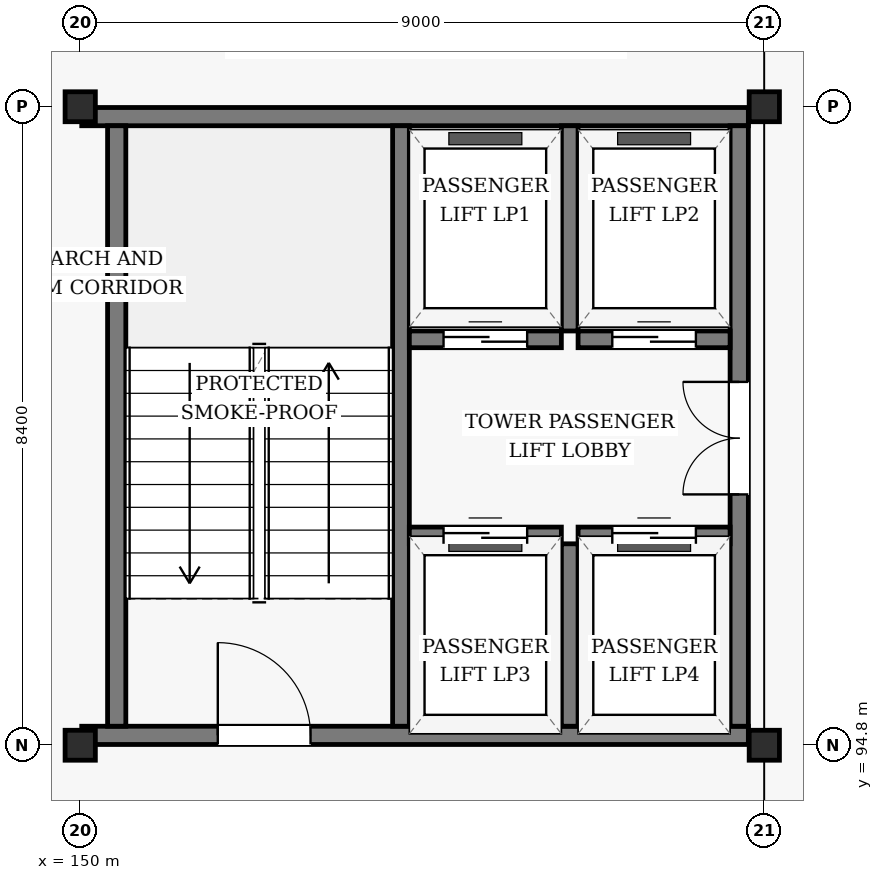
"""IFC4 building model, lengths in metres.
Left out: names, types, materials, properties, quantities, classifications, styles, units other than length and angle.
Written with IfcOpenShell. Run it as: python <this file> out.ifc"""

import sys

from ifc_helpers import new_model, si_unit, direction, frame, frame_2d, origin, origin_2d, place, context, subcontext, project, spatial, rectangle, i_section, extrude, element, fill, save


model = new_model("IFC4")
c1 = context("Model", 3, precision=1e-05, world=origin(), true_north=direction((0.0, 1.0)))
c2 = subcontext(c1, "Body", "Model", "MODEL_VIEW")
j1 = project(units=[si_unit("LENGTHUNIT", "METRE"), si_unit("PLANEANGLEUNIT", "RADIAN")], contexts=[c1])
p1 = place(None, origin())
s1 = spatial("IfcSite", under=j1, at=p1, CompositionType="ELEMENT")
p2 = place(p1, origin())
s2 = spatial("IfcBuilding", under=s1, at=p2, CompositionType="ELEMENT")
p3 = place(p2, frame((0.0, 0.0, 24.6)))
s3 = spatial("IfcBuildingStorey", under=s2, at=p3, CompositionType="ELEMENT", Elevation=24.6)
for number, where, z_axis, x_axis in (
    (1, (150.0, 94.8, 0.0), (0.0, 0.0, 1.0), (1.0, 0.0, 0.0)),
    (2, (150.0, 103.2, 0.0), (0.0, 0.0, 1.0), (1.0, 0.0, 0.0)),
    (3, (159.0, 94.8, 0.0), (0.0, 0.0, 1.0), (1.0, 0.0, 0.0)),
    (4, (159.0, 103.2, 0.0), (0.0, 0.0, 1.0), (1.0, 0.0, 0.0)),
):
    element("IfcColumn", number, at=place(p3, frame(where, z_axis=z_axis, x_axis=x_axis)), inside=s3, PredefinedType="COLUMN", context=c2, shape_type="SweptSolid", body=[
        extrude(i_section(OverallWidth=0.398, OverallDepth=0.394, WebThickness=0.011, FlangeThickness=0.018, FilletRadius=0.022, at=origin_2d()), origin(), (0.0, 0.0, 1.0), 3.6),
    ])
p4 = place(p3, frame((150.02, 94.93, 0.0), z_axis=(0.0, 0.0, 1.0), x_axis=(1.0, 0.0, 0.0)))
e5 = element("IfcWall", 5, at=p4, inside=s3, PredefinedType="SHEAR", context=c2, shape_type="SweptSolid", body=[
    extrude(rectangle(XDim=8.77, YDim=0.24, at=frame_2d((4.385, 0.0))), origin(), (0.0, 0.0, 1.0), 3.345),
])
p5 = place(p4, frame((1.79, 0.0, 0.0)))
e6 = element("IfcOpeningElement", 6, at=p5, cuts=e5, PredefinedType="OPENING", context=c2, shape_type="SweptSolid", body=[
    extrude(rectangle(XDim=1.22, YDim=2.18, at=frame_2d((0.61, 1.09))), frame((0.0, 0.13, 0.0), z_axis=(0.0, -1.0, 0.0), x_axis=(1.0, 0.0, 0.0)), (0.0, 0.0, 1.0), 0.26),
])
p6 = place(p3, frame((150.02, 103.07, 0.0), z_axis=(0.0, 0.0, 1.0), x_axis=(1.0, 0.0, 0.0)))
e7 = element("IfcWall", 7, at=p6, inside=s3, PredefinedType="SHEAR", context=c2, shape_type="SweptSolid", body=[
    extrude(rectangle(XDim=8.77, YDim=0.24, at=frame_2d((4.385, 0.0))), origin(), (0.0, 0.0, 1.0), 3.345),
])
p7 = place(p3, frame((150.48, 95.05, 0.0), z_axis=(0.0, 0.0, 1.0), x_axis=(0.0, 1.0, 0.0)))
e8 = element("IfcWall", 8, at=p7, inside=s3, PredefinedType="SHEAR", context=c2, shape_type="SweptSolid", body=[
    extrude(rectangle(XDim=7.9, YDim=0.24, at=frame_2d((3.95, 0.0))), origin(), (0.0, 0.0, 1.0), 3.345),
])
p8 = place(p3, frame((154.22, 95.05, 0.0), z_axis=(0.0, 0.0, 1.0), x_axis=(0.0, 1.0, 0.0)))
e9 = element("IfcWall", 9, at=p8, inside=s3, PredefinedType="SHEAR", context=c2, shape_type="SweptSolid", body=[
    extrude(rectangle(XDim=7.9, YDim=0.22, at=frame_2d((3.95, 0.0))), origin(), (0.0, 0.0, 1.0), 3.345),
])
p9 = place(p3, frame((158.67, 95.05, 0.0), z_axis=(0.0, 0.0, 1.0), x_axis=(0.0, 1.0, 0.0)))
e10 = element("IfcWall", 10, at=p9, inside=s3, PredefinedType="SHEAR", context=c2, shape_type="SweptSolid", body=[
    extrude(rectangle(XDim=7.9, YDim=0.24, at=frame_2d((3.95, 0.0))), origin(), (0.0, 0.0, 1.0), 3.345),
])
p10 = place(p9, frame((3.05, 0.0, 0.0)))
e11 = element("IfcOpeningElement", 11, at=p10, cuts=e10, PredefinedType="OPENING", context=c2, shape_type="SweptSolid", body=[
    extrude(rectangle(XDim=1.48, YDim=2.22, at=frame_2d((0.74, 1.11))), frame((0.0, 0.13, 0.0), z_axis=(0.0, -1.0, 0.0), x_axis=(1.0, 0.0, 0.0)), (0.0, 0.0, 1.0), 0.26),
])
p11 = place(p3, frame((156.44, 100.25, 0.0), z_axis=(0.0, 0.0, 1.0), x_axis=(0.0, 1.0, 0.0)))
e12 = element("IfcWall", 12, at=p11, inside=s3, PredefinedType="SHEAR", context=c2, shape_type="SweptSolid", body=[
    extrude(rectangle(XDim=2.7, YDim=0.22, at=frame_2d((1.35, 0.0))), origin(), (0.0, 0.0, 1.0), 3.345),
])
p12 = place(p3, frame((154.33, 100.14, 0.0), z_axis=(0.0, 0.0, 1.0), x_axis=(1.0, 0.0, 0.0)))
e13 = element("IfcWall", 13, at=p12, inside=s3, PredefinedType="SHEAR", context=c2, shape_type="SweptSolid", body=[
    extrude(rectangle(XDim=2.0, YDim=0.22, at=frame_2d((1.0, 0.0))), origin(), (0.0, 0.0, 1.0), 3.345),
])
p13 = place(p12, frame((0.45, 0.0, 0.0)))
e14 = element("IfcOpeningElement", 14, at=p13, cuts=e13, PredefinedType="OPENING", context=c2, shape_type="SweptSolid", body=[
    extrude(rectangle(XDim=1.1, YDim=2.15, at=frame_2d((0.55, 1.075))), frame((0.0, 0.12, 0.0), z_axis=(0.0, -1.0, 0.0), x_axis=(1.0, 0.0, 0.0)), (0.0, 0.0, 1.0), 0.24),
])
p14 = place(p3, frame((156.55, 100.14, 0.0), z_axis=(0.0, 0.0, 1.0), x_axis=(1.0, 0.0, 0.0)))
e15 = element("IfcWall", 15, at=p14, inside=s3, PredefinedType="SHEAR", context=c2, shape_type="SweptSolid", body=[
    extrude(rectangle(XDim=2.0, YDim=0.22, at=frame_2d((1.0, 0.0))), origin(), (0.0, 0.0, 1.0), 3.345),
])
p15 = place(p14, frame((0.45, 0.0, 0.0)))
e16 = element("IfcOpeningElement", 16, at=p15, cuts=e15, PredefinedType="OPENING", context=c2, shape_type="SweptSolid", body=[
    extrude(rectangle(XDim=1.1, YDim=2.15, at=frame_2d((0.55, 1.075))), frame((0.0, 0.12, 0.0), z_axis=(0.0, -1.0, 0.0), x_axis=(1.0, 0.0, 0.0)), (0.0, 0.0, 1.0), 0.24),
])
p16 = place(p3, frame((156.44, 95.05, 0.0), z_axis=(0.0, 0.0, 1.0), x_axis=(0.0, 1.0, 0.0)))
e17 = element("IfcWall", 17, at=p16, inside=s3, PredefinedType="SHEAR", context=c2, shape_type="SweptSolid", body=[
    extrude(rectangle(XDim=2.4, YDim=0.22, at=frame_2d((1.2, 0.0))), origin(), (0.0, 0.0, 1.0), 3.345),
])
p17 = place(p3, frame((154.33, 97.56, 0.0), z_axis=(0.0, 0.0, 1.0), x_axis=(1.0, 0.0, 0.0)))
e18 = element("IfcWall", 18, at=p17, inside=s3, PredefinedType="SHEAR", context=c2, shape_type="SweptSolid", body=[
    extrude(rectangle(XDim=2.0, YDim=0.22, at=frame_2d((1.0, 0.0))), origin(), (0.0, 0.0, 1.0), 3.345),
])
p18 = place(p17, frame((0.45, 0.0, 0.0)))
e19 = element("IfcOpeningElement", 19, at=p18, cuts=e18, PredefinedType="OPENING", context=c2, shape_type="SweptSolid", body=[
    extrude(rectangle(XDim=1.1, YDim=2.15, at=frame_2d((0.55, 1.075))), frame((0.0, 0.12, 0.0), z_axis=(0.0, -1.0, 0.0), x_axis=(1.0, 0.0, 0.0)), (0.0, 0.0, 1.0), 0.24),
])
p19 = place(p3, frame((156.55, 97.56, 0.0), z_axis=(0.0, 0.0, 1.0), x_axis=(1.0, 0.0, 0.0)))
e20 = element("IfcWall", 20, at=p19, inside=s3, PredefinedType="SHEAR", context=c2, shape_type="SweptSolid", body=[
    extrude(rectangle(XDim=2.0, YDim=0.22, at=frame_2d((1.0, 0.0))), origin(), (0.0, 0.0, 1.0), 3.345),
])
p20 = place(p19, frame((0.45, 0.0, 0.0)))
e21 = element("IfcOpeningElement", 21, at=p20, cuts=e20, PredefinedType="OPENING", context=c2, shape_type="SweptSolid", body=[
    extrude(rectangle(XDim=1.1, YDim=2.15, at=frame_2d((0.55, 1.075))), frame((0.0, 0.12, 0.0), z_axis=(0.0, -1.0, 0.0), x_axis=(1.0, 0.0, 0.0)), (0.0, 0.0, 1.0), 0.24),
])
p21 = place(p5, origin())
e22 = element("IfcDoor", 22, at=p21, inside=s3, OperationType="SINGLE_SWING_LEFT", PredefinedType="DOOR", context=c2, shape_type="SweptSolid", body=[
    extrude(rectangle(XDim=1.22, YDim=2.18, at=frame_2d((0.61, 1.09))), frame((0.0, 0.025, 0.0), z_axis=(0.0, -1.0, 0.0), x_axis=(1.0, 0.0, 0.0)), (0.0, 0.0, 1.0), 0.05),
])
fill(e6, e22)
p22 = place(p10, origin())
e23 = element("IfcDoor", 23, at=p22, inside=s3, OperationType="DOUBLE_DOOR_SINGLE_SWING", PredefinedType="DOOR", context=c2, shape_type="SweptSolid", body=[
    extrude(rectangle(XDim=1.48, YDim=2.22, at=frame_2d((0.74, 1.11))), frame((0.0, 0.025, 0.0), z_axis=(0.0, -1.0, 0.0), x_axis=(1.0, 0.0, 0.0)), (0.0, 0.0, 1.0), 0.05),
])
fill(e11, e23)
p23 = place(p13, origin())
e24 = element("IfcDoor", 24, at=p23, inside=s3, OperationType="SLIDING_TO_LEFT", PredefinedType="DOOR", context=c2, shape_type="SweptSolid", body=[
    extrude(rectangle(XDim=1.1, YDim=2.15, at=frame_2d((0.55, 1.075))), frame((0.0, 0.025, 0.0), z_axis=(0.0, -1.0, 0.0), x_axis=(1.0, 0.0, 0.0)), (0.0, 0.0, 1.0), 0.05),
])
fill(e14, e24)
p24 = place(p15, origin())
e25 = element("IfcDoor", 25, at=p24, inside=s3, OperationType="SLIDING_TO_LEFT", PredefinedType="DOOR", context=c2, shape_type="SweptSolid", body=[
    extrude(rectangle(XDim=1.1, YDim=2.15, at=frame_2d((0.55, 1.075))), frame((0.0, 0.025, 0.0), z_axis=(0.0, -1.0, 0.0), x_axis=(1.0, 0.0, 0.0)), (0.0, 0.0, 1.0), 0.05),
])
fill(e16, e25)
p25 = place(p18, origin())
e26 = element("IfcDoor", 26, at=p25, inside=s3, OperationType="SLIDING_TO_LEFT", PredefinedType="DOOR", context=c2, shape_type="SweptSolid", body=[
    extrude(rectangle(XDim=1.1, YDim=2.15, at=frame_2d((0.55, 1.075))), frame((0.0, 0.025, 0.0), z_axis=(0.0, -1.0, 0.0), x_axis=(1.0, 0.0, 0.0)), (0.0, 0.0, 1.0), 0.05),
])
fill(e19, e26)
p26 = place(p20, origin())
e27 = element("IfcDoor", 27, at=p26, inside=s3, OperationType="SLIDING_TO_LEFT", PredefinedType="DOOR", context=c2, shape_type="SweptSolid", body=[
    extrude(rectangle(XDim=1.1, YDim=2.15, at=frame_2d((0.55, 1.075))), frame((0.0, 0.025, 0.0), z_axis=(0.0, -1.0, 0.0), x_axis=(1.0, 0.0, 0.0)), (0.0, 0.0, 1.0), 0.05),
])
fill(e21, e27)
save(model, sys.argv[1])
